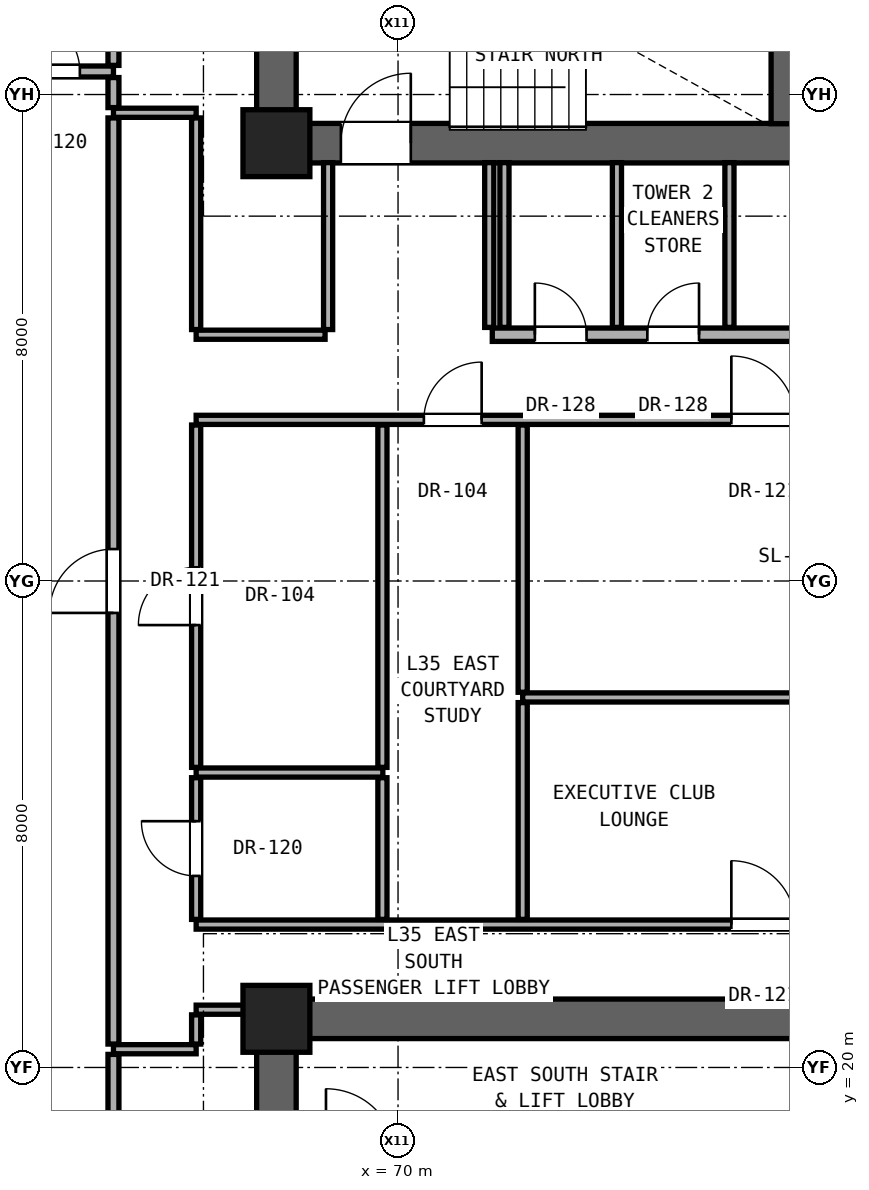
"""IFC4 building model, lengths in metres.
Left out: names, types, materials, properties, quantities, classifications, styles, units other than length and angle.
Written with IfcOpenShell. Run it as: python <this file> out.ifc"""

import sys

from ifc_helpers import new_model, si_unit, direction, frame, frame_2d, origin, origin_2d, place, context, subcontext, project, spatial, rectangle, extrude, element, fill, save


model = new_model("IFC4")
c1 = context("Model", 3, precision=1e-05, world=origin(), true_north=direction((0.0, 1.0)))
c2 = subcontext(c1, "Body", "Model", "MODEL_VIEW")
j1 = project(units=[si_unit("LENGTHUNIT", "METRE"), si_unit("PLANEANGLEUNIT", "RADIAN")], contexts=[c1])
p1 = place(None, origin())
s1 = spatial("IfcSite", under=j1, at=p1, CompositionType="ELEMENT")
p2 = place(p1, origin())
s2 = spatial("IfcBuilding", under=s1, at=p2, CompositionType="ELEMENT")
p3 = place(p2, frame((0.0, 0.0, 124.7)))
s3 = spatial("IfcBuildingStorey", under=s2, at=p3, CompositionType="ELEMENT", Elevation=124.7)
for number, where, z_axis, x_axis in (
    (1, (68.0, 20.8, 0.0), (0.0, 0.0, 1.0), (1.0, 0.0, 0.0)),
    (2, (68.0, 35.2, 0.0), (0.0, 0.0, 1.0), (1.0, 0.0, 0.0)),
):
    element("IfcColumn", number, at=place(p3, frame(where, z_axis=z_axis, x_axis=x_axis)), inside=s3, PredefinedType="COLUMN", context=c2, shape_type="SweptSolid", body=[
        extrude(rectangle(XDim=1.1, YDim=1.1, at=origin_2d()), origin(), (0.0, 0.0, 1.0), 3.3),
    ])
p4 = place(p3, frame((68.0, 35.2, 0.0), z_axis=(0.0, 0.0, 1.0), x_axis=(0.0, 1.0, 0.0)))
e3 = element("IfcWall", 3, at=p4, inside=s3, PredefinedType="SHEAR", context=c2, shape_type="SweptSolid", body=[
    extrude(rectangle(XDim=5.6, YDim=0.65, at=frame_2d((2.8, 0.0))), origin(), (0.0, 0.0, 1.0), 3.08),
])
p5 = place(p3, frame((68.0, 35.2, 0.0), z_axis=(0.0, 0.0, 1.0), x_axis=(1.0, 0.0, 0.0)))
e4 = element("IfcWall", 4, at=p5, inside=s3, PredefinedType="SHEAR", context=c2, shape_type="SweptSolid", body=[
    extrude(rectangle(XDim=17.0, YDim=0.65, at=frame_2d((8.5, 0.0))), origin(), (0.0, 0.0, 1.0), 3.08),
])
p6 = place(p5, frame((1.06, 0.0, 0.0)))
e5 = element("IfcOpeningElement", 5, at=p6, cuts=e4, PredefinedType="OPENING", context=c2, shape_type="SweptSolid", body=[
    extrude(rectangle(XDim=1.15, YDim=2.2, at=frame_2d((0.575, 1.1))), frame((0.0, 0.335, 0.0), z_axis=(0.0, -1.0, 0.0), x_axis=(1.0, 0.0, 0.0)), (0.0, 0.0, 1.0), 0.67),
])
p7 = place(p5, frame((8.75, 0.0, 0.0)))
e6 = element("IfcOpeningElement", 6, at=p7, cuts=e4, PredefinedType="OPENING", context=c2, shape_type="SweptSolid", body=[
    extrude(rectangle(XDim=1.4, YDim=2.35, at=frame_2d((0.7, 1.175))), frame((0.0, 0.335, 0.0), z_axis=(0.0, -1.0, 0.0), x_axis=(1.0, 0.0, 0.0)), (0.0, 0.0, 1.0), 0.67),
])
p8 = place(p5, frame((10.77, 0.0, 0.0)))
e7 = element("IfcOpeningElement", 7, at=p8, cuts=e4, PredefinedType="OPENING", context=c2, shape_type="SweptSolid", body=[
    extrude(rectangle(XDim=1.3, YDim=2.3, at=frame_2d((0.65, 1.15))), frame((0.0, 0.335, 0.0), z_axis=(0.0, -1.0, 0.0), x_axis=(1.0, 0.0, 0.0)), (0.0, 0.0, 1.0), 0.67),
])
p9 = place(p3, frame((68.0, 15.2, 0.0), z_axis=(0.0, 0.0, 1.0), x_axis=(0.0, 1.0, 0.0)))
e8 = element("IfcWall", 8, at=p9, inside=s3, PredefinedType="SHEAR", context=c2, shape_type="SweptSolid", body=[
    extrude(rectangle(XDim=5.6, YDim=0.65, at=frame_2d((2.8, 0.0))), origin(), (0.0, 0.0, 1.0), 3.08),
])
p10 = place(p3, frame((68.0, 20.8, 0.0), z_axis=(0.0, 0.0, 1.0), x_axis=(1.0, 0.0, 0.0)))
e9 = element("IfcWall", 9, at=p10, inside=s3, PredefinedType="SHEAR", context=c2, shape_type="SweptSolid", body=[
    extrude(rectangle(XDim=17.0, YDim=0.65, at=frame_2d((8.5, 0.0))), origin(), (0.0, 0.0, 1.0), 3.08),
])
p11 = place(p10, frame((9.55, 0.0, 0.0)))
e10 = element("IfcOpeningElement", 10, at=p11, cuts=e9, PredefinedType="OPENING", context=c2, shape_type="SweptSolid", body=[
    extrude(rectangle(XDim=1.3, YDim=2.3, at=frame_2d((0.65, 1.15))), frame((0.0, 0.335, 0.0), z_axis=(0.0, -1.0, 0.0), x_axis=(1.0, 0.0, 0.0)), (0.0, 0.0, 1.0), 0.67),
])
p12 = place(p10, frame((12.05, 0.0, 0.0)))
e11 = element("IfcOpeningElement", 11, at=p12, cuts=e9, PredefinedType="OPENING", context=c2, shape_type="SweptSolid", body=[
    extrude(rectangle(XDim=1.3, YDim=2.3, at=frame_2d((0.65, 1.15))), frame((0.0, 0.335, 0.0), z_axis=(0.0, -1.0, 0.0), x_axis=(1.0, 0.0, 0.0)), (0.0, 0.0, 1.0), 0.67),
])
p13 = place(p3, frame((65.32, 20.3, 0.0), z_axis=(0.0, 0.0, 1.0), x_axis=(1.0, 0.0, 0.0)))
e12 = element("IfcWall", 12, at=p13, inside=s3, PredefinedType="PARTITIONING", context=c2, shape_type="SweptSolid", body=[
    extrude(rectangle(XDim=1.36, YDim=0.15, at=frame_2d((0.68, 0.0))), origin(), (0.0, 0.0, 1.0), 3.08),
])
p14 = place(p3, frame((66.68, 20.95, 0.0), z_axis=(0.0, 0.0, 1.0), x_axis=(1.0, 0.0, 0.0)))
e13 = element("IfcWall", 13, at=p14, inside=s3, PredefinedType="PARTITIONING", context=c2, shape_type="SweptSolid", body=[
    extrude(rectangle(XDim=1.0, YDim=0.15, at=frame_2d((0.5, 0.0))), origin(), (0.0, 0.0, 1.0), 2.472),
])
p15 = place(p3, frame((66.68, 22.35, 0.0), z_axis=(0.0, 0.0, 1.0), x_axis=(1.0, 0.0, 0.0)))
e14 = element("IfcWall", 14, at=p15, inside=s3, PredefinedType="PARTITIONING", context=c2, shape_type="SweptSolid", body=[
    extrude(rectangle(XDim=19.5, YDim=0.15, at=frame_2d((9.75, 0.0))), origin(), (0.0, 0.0, 1.0), 2.216),
])
p16 = place(p15, frame((8.802, 0.0, 0.0)))
e15 = element("IfcOpeningElement", 15, at=p16, cuts=e14, PredefinedType="OPENING", context=c2, shape_type="SweptSolid", body=[
    extrude(rectangle(XDim=1.05, YDim=2.2, at=frame_2d((0.525, 1.1))), frame((0.0, 0.085, 0.0), z_axis=(0.0, -1.0, 0.0), x_axis=(1.0, 0.0, 0.0)), (0.0, 0.0, 1.0), 0.17),
])
p17 = place(p15, frame((15.846, 0.0, 0.0)))
e16 = element("IfcOpeningElement", 16, at=p17, cuts=e14, PredefinedType="OPENING", context=c2, shape_type="SweptSolid", body=[
    extrude(rectangle(XDim=1.05, YDim=2.2, at=frame_2d((0.525, 1.1))), frame((0.0, 0.085, 0.0), z_axis=(0.0, -1.0, 0.0), x_axis=(1.0, 0.0, 0.0)), (0.0, 0.0, 1.0), 0.17),
])
p18 = place(p3, frame((66.68, 24.85, 0.0), z_axis=(0.0, 0.0, 1.0), x_axis=(1.0, 0.0, 0.0)))
e17 = element("IfcWall", 17, at=p18, inside=s3, PredefinedType="PARTITIONING", context=c2, shape_type="SweptSolid", body=[
    extrude(rectangle(XDim=3.07, YDim=0.15, at=frame_2d((1.535, 0.0))), origin(), (0.0, 0.0, 1.0), 2.216),
])
p19 = place(p3, frame((72.05, 26.085, 0.0), z_axis=(0.0, 0.0, 1.0), x_axis=(1.0, 0.0, 0.0)))
e18 = element("IfcWall", 18, at=p19, inside=s3, PredefinedType="PARTITIONING", context=c2, shape_type="SweptSolid", body=[
    extrude(rectangle(XDim=14.13, YDim=0.15, at=frame_2d((7.065, 0.0))), origin(), (0.0, 0.0, 1.0), 2.216),
])
p20 = place(p3, frame((66.68, 30.65, 0.0), z_axis=(0.0, 0.0, 1.0), x_axis=(1.0, 0.0, 0.0)))
e19 = element("IfcWall", 19, at=p20, inside=s3, PredefinedType="PARTITIONING", context=c2, shape_type="SweptSolid", body=[
    extrude(rectangle(XDim=19.5, YDim=0.15, at=frame_2d((9.75, 0.0))), origin(), (0.0, 0.0, 1.0), 2.216),
])
p21 = place(p20, frame((3.745, 0.0, 0.0)))
e20 = element("IfcOpeningElement", 20, at=p21, cuts=e19, PredefinedType="OPENING", context=c2, shape_type="SweptSolid", body=[
    extrude(rectangle(XDim=0.95, YDim=2.15, at=frame_2d((0.475, 1.075))), frame((0.0, 0.085, 0.0), z_axis=(0.0, -1.0, 0.0), x_axis=(1.0, 0.0, 0.0)), (0.0, 0.0, 1.0), 0.17),
])
p22 = place(p20, frame((8.802, 0.0, 0.0)))
e21 = element("IfcOpeningElement", 21, at=p22, cuts=e19, PredefinedType="OPENING", context=c2, shape_type="SweptSolid", body=[
    extrude(rectangle(XDim=1.05, YDim=2.2, at=frame_2d((0.525, 1.1))), frame((0.0, 0.085, 0.0), z_axis=(0.0, -1.0, 0.0), x_axis=(1.0, 0.0, 0.0)), (0.0, 0.0, 1.0), 0.17),
])
p23 = place(p20, frame((15.846, 0.0, 0.0)))
e22 = element("IfcOpeningElement", 22, at=p23, cuts=e19, PredefinedType="OPENING", context=c2, shape_type="SweptSolid", body=[
    extrude(rectangle(XDim=1.05, YDim=2.2, at=frame_2d((0.525, 1.1))), frame((0.0, 0.085, 0.0), z_axis=(0.0, -1.0, 0.0), x_axis=(1.0, 0.0, 0.0)), (0.0, 0.0, 1.0), 0.17),
])
p24 = place(p3, frame((66.68, 32.05, 0.0), z_axis=(0.0, 0.0, 1.0), x_axis=(1.0, 0.0, 0.0)))
e23 = element("IfcWall", 23, at=p24, inside=s3, PredefinedType="PARTITIONING", context=c2, shape_type="SweptSolid", body=[
    extrude(rectangle(XDim=2.12, YDim=0.15, at=frame_2d((1.06, 0.0))), origin(), (0.0, 0.0, 1.0), 2.216),
])
p25 = place(p3, frame((71.55, 32.05, 0.0), z_axis=(0.0, 0.0, 1.0), x_axis=(1.0, 0.0, 0.0)))
e24 = element("IfcWall", 24, at=p25, inside=s3, PredefinedType="SOLIDWALL", context=c2, shape_type="SweptSolid", body=[
    extrude(rectangle(XDim=14.63, YDim=0.22, at=frame_2d((7.315, 0.0))), origin(), (0.0, 0.0, 1.0), 2.216),
])
p26 = place(p25, frame((6.065, 0.0, 0.0)))
e25 = element("IfcOpeningElement", 25, at=p26, cuts=e24, PredefinedType="OPENING", context=c2, shape_type="SweptSolid", body=[
    extrude(rectangle(XDim=0.85, YDim=2.01, at=frame_2d((0.425, 1.005))), frame((0.0, 0.12, 0.0), z_axis=(0.0, -1.0, 0.0), x_axis=(1.0, 0.0, 0.0)), (0.0, 0.0, 1.0), 0.24),
])
p27 = place(p25, frame((10.535, 0.0, 0.0)))
e26 = element("IfcOpeningElement", 26, at=p27, cuts=e24, PredefinedType="OPENING", context=c2, shape_type="SweptSolid", body=[
    extrude(rectangle(XDim=0.95, YDim=2.15, at=frame_2d((0.475, 1.075))), frame((0.0, 0.12, 0.0), z_axis=(0.0, -1.0, 0.0), x_axis=(1.0, 0.0, 0.0)), (0.0, 0.0, 1.0), 0.24),
])
p28 = place(p25, frame((0.7, 0.0, 0.0)))
e27 = element("IfcOpeningElement", 27, at=p28, cuts=e24, PredefinedType="OPENING", context=c2, shape_type="SweptSolid", body=[
    extrude(rectangle(XDim=0.85, YDim=2.01, at=frame_2d((0.425, 1.005))), frame((0.0, 0.12, 0.0), z_axis=(0.0, -1.0, 0.0), x_axis=(1.0, 0.0, 0.0)), (0.0, 0.0, 1.0), 0.24),
])
p29 = place(p25, frame((2.55, 0.0, 0.0)))
e28 = element("IfcOpeningElement", 28, at=p29, cuts=e24, PredefinedType="OPENING", context=c2, shape_type="SweptSolid", body=[
    extrude(rectangle(XDim=0.85, YDim=2.01, at=frame_2d((0.425, 1.005))), frame((0.0, 0.12, 0.0), z_axis=(0.0, -1.0, 0.0), x_axis=(1.0, 0.0, 0.0)), (0.0, 0.0, 1.0), 0.24),
])
p30 = place(p3, frame((65.32, 35.7, 0.0), z_axis=(0.0, 0.0, 1.0), x_axis=(1.0, 0.0, 0.0)))
e29 = element("IfcWall", 29, at=p30, inside=s3, PredefinedType="PARTITIONING", context=c2, shape_type="SweptSolid", body=[
    extrude(rectangle(XDim=1.36, YDim=0.15, at=frame_2d((0.68, 0.0))), origin(), (0.0, 0.0, 1.0), 3.08),
])
p31 = place(p3, frame((59.179, 36.379, 0.0), z_axis=(0.0, 0.0, 1.0), x_axis=(1.0, 0.0, 0.0)))
e30 = element("IfcWall", 30, at=p31, inside=s3, PredefinedType="PARTITIONING", context=c2, shape_type="SweptSolid", body=[
    extrude(rectangle(XDim=6.141, YDim=0.18, at=frame_2d((3.071, 0.0))), origin(), (0.0, 0.0, 1.0), 2.523),
])
p32 = place(p31, frame((2.583, 0.0, 0.0)))
e31 = element("IfcOpeningElement", 31, at=p32, cuts=e30, PredefinedType="OPENING", context=c2, shape_type="SweptSolid", body=[
    extrude(rectangle(XDim=0.95, YDim=2.15, at=frame_2d((0.475, 1.075))), frame((0.0, 0.1, 0.0), z_axis=(0.0, -1.0, 0.0), x_axis=(1.0, 0.0, 0.0)), (0.0, 0.0, 1.0), 0.2),
])
p33 = place(p31, frame((4.688, 0.0, 0.0)))
e32 = element("IfcOpeningElement", 32, at=p33, cuts=e30, PredefinedType="OPENING", context=c2, shape_type="SweptSolid", body=[
    extrude(rectangle(XDim=0.9, YDim=2.1, at=frame_2d((0.45, 1.05))), frame((0.0, 0.1, 0.0), z_axis=(0.0, -1.0, 0.0), x_axis=(1.0, 0.0, 0.0)), (0.0, 0.0, 1.0), 0.2),
])
p34 = place(p3, frame((65.32, 17.001, 0.0), z_axis=(0.0, 0.0, 1.0), x_axis=(0.0, 1.0, 0.0)))
e33 = element("IfcWall", 33, at=p34, inside=s3, PredefinedType="PARTITIONING", context=c2, shape_type="SweptSolid", body=[
    extrude(rectangle(XDim=3.214, YDim=0.18, at=frame_2d((1.607, 0.0))), origin(), (0.0, 0.0, 1.0), 2.523),
])
p35 = place(p3, frame((65.32, 20.385, 0.0), z_axis=(0.0, 0.0, 1.0), x_axis=(0.0, 1.0, 0.0)))
e34 = element("IfcWall", 34, at=p35, inside=s3, PredefinedType="PARTITIONING", context=c2, shape_type="SweptSolid", body=[
    extrude(rectangle(XDim=15.23, YDim=0.18, at=frame_2d((7.615, 0.0))), origin(), (0.0, 0.0, 1.0), 2.376),
])
p36 = place(p35, frame((7.09, 0.0, 0.0)))
e35 = element("IfcOpeningElement", 35, at=p36, cuts=e34, PredefinedType="OPENING", context=c2, shape_type="SweptSolid", body=[
    extrude(rectangle(XDim=1.05, YDim=2.2, at=frame_2d((0.525, 1.1))), frame((0.0, 0.1, 0.0), z_axis=(0.0, -1.0, 0.0), x_axis=(1.0, 0.0, 0.0)), (0.0, 0.0, 1.0), 0.2),
])
p37 = place(p3, frame((65.32, 35.785, 0.0), z_axis=(0.0, 0.0, 1.0), x_axis=(0.0, 1.0, 0.0)))
e36 = element("IfcWall", 36, at=p37, inside=s3, PredefinedType="PARTITIONING", context=c2, shape_type="SweptSolid", body=[
    extrude(rectangle(XDim=0.494, YDim=0.18, at=frame_2d((0.247, 0.0))), origin(), (0.0, 0.0, 1.0), 3.08),
])
p38 = place(p3, frame((65.32, 36.479, 0.0), z_axis=(0.0, 0.0, 1.0), x_axis=(0.0, 1.0, 0.0)))
e37 = element("IfcWall", 37, at=p38, inside=s3, PredefinedType="PARTITIONING", context=c2, shape_type="SweptSolid", body=[
    extrude(rectangle(XDim=2.548, YDim=0.18, at=frame_2d((1.274, 0.0))), origin(), (0.0, 0.0, 1.0), 2.523),
])
p39 = place(p3, frame((66.68, 20.385, 0.0), z_axis=(0.0, 0.0, 1.0), x_axis=(0.0, 1.0, 0.0)))
e38 = element("IfcWall", 38, at=p39, inside=s3, PredefinedType="PARTITIONING", context=c2, shape_type="SweptSolid", body=[
    extrude(rectangle(XDim=0.48, YDim=0.15, at=frame_2d((0.24, 0.0))), origin(), (0.0, 0.0, 1.0), 2.472),
])
p40 = place(p3, frame((66.68, 22.435, 0.0), z_axis=(0.0, 0.0, 1.0), x_axis=(0.0, 1.0, 0.0)))
e39 = element("IfcWall", 39, at=p40, inside=s3, PredefinedType="PARTITIONING", context=c2, shape_type="SweptSolid", body=[
    extrude(rectangle(XDim=2.33, YDim=0.15, at=frame_2d((1.165, 0.0))), origin(), (0.0, 0.0, 1.0), 3.08),
])
p41 = place(p40, frame((0.715, 0.0, 0.0)))
e40 = element("IfcOpeningElement", 40, at=p41, cuts=e39, PredefinedType="OPENING", context=c2, shape_type="SweptSolid", body=[
    extrude(rectangle(XDim=0.9, YDim=2.1, at=frame_2d((0.45, 1.05))), frame((0.0, 0.085, 0.0), z_axis=(0.0, -1.0, 0.0), x_axis=(1.0, 0.0, 0.0)), (0.0, 0.0, 1.0), 0.17),
])
p42 = place(p3, frame((66.68, 24.935, 0.0), z_axis=(0.0, 0.0, 1.0), x_axis=(0.0, 1.0, 0.0)))
e41 = element("IfcWall", 41, at=p42, inside=s3, PredefinedType="PARTITIONING", context=c2, shape_type="SweptSolid", body=[
    extrude(rectangle(XDim=5.63, YDim=0.15, at=frame_2d((2.815, 0.0))), origin(), (0.0, 0.0, 1.0), 2.376),
])
p43 = place(p42, frame((2.34, 0.0, 0.0)))
e42 = element("IfcOpeningElement", 42, at=p43, cuts=e41, PredefinedType="OPENING", context=c2, shape_type="SweptSolid", body=[
    extrude(rectangle(XDim=0.95, YDim=2.15, at=frame_2d((0.475, 1.075))), frame((0.0, 0.085, 0.0), z_axis=(0.0, -1.0, 0.0), x_axis=(1.0, 0.0, 0.0)), (0.0, 0.0, 1.0), 0.17),
])
p44 = place(p3, frame((66.68, 32.135, 0.0), z_axis=(0.0, 0.0, 1.0), x_axis=(0.0, 1.0, 0.0)))
e43 = element("IfcWall", 43, at=p44, inside=s3, PredefinedType="PARTITIONING", context=c2, shape_type="SweptSolid", body=[
    extrude(rectangle(XDim=3.48, YDim=0.15, at=frame_2d((1.74, 0.0))), origin(), (0.0, 0.0, 1.0), 2.472),
])
p45 = place(p3, frame((68.85, 32.135, 0.0), z_axis=(0.0, 0.0, 1.0), x_axis=(0.0, 1.0, 0.0)))
e44 = element("IfcWall", 44, at=p45, inside=s3, PredefinedType="PARTITIONING", context=c2, shape_type="SweptSolid", body=[
    extrude(rectangle(XDim=2.745, YDim=0.15, at=frame_2d((1.373, 0.0))), origin(), (0.0, 0.0, 1.0), 3.08),
])
p46 = place(p3, frame((69.743, 22.435, 0.0), z_axis=(0.0, 0.0, 1.0), x_axis=(0.0, 1.0, 0.0)))
e45 = element("IfcWall", 45, at=p46, inside=s3, PredefinedType="PARTITIONING", context=c2, shape_type="SweptSolid", body=[
    extrude(rectangle(XDim=2.33, YDim=0.15, at=frame_2d((1.165, 0.0))), origin(), (0.0, 0.0, 1.0), 3.08),
])
p47 = place(p3, frame((69.743, 24.935, 0.0), z_axis=(0.0, 0.0, 1.0), x_axis=(0.0, 1.0, 0.0)))
e46 = element("IfcWall", 46, at=p47, inside=s3, PredefinedType="PARTITIONING", context=c2, shape_type="SweptSolid", body=[
    extrude(rectangle(XDim=5.63, YDim=0.15, at=frame_2d((2.815, 0.0))), origin(), (0.0, 0.0, 1.0), 2.216),
])
for number, where, z_axis, x_axis in (
    (47, (71.5, 32.17, 0.0), (0.0, 0.0, 1.0), (0.0, 1.0, 0.0)),
    (48, (71.75, 32.17, 0.0), (0.0, 0.0, 1.0), (0.0, 1.0, 0.0)),
):
    element("IfcWall", number, at=place(p3, frame(where, z_axis=z_axis, x_axis=x_axis)), inside=s3, PredefinedType="PARTITIONING", context=c2, shape_type="SweptSolid", body=[
        extrude(rectangle(XDim=2.71, YDim=0.15, at=frame_2d((1.355, 0.0))), origin(), (0.0, 0.0, 1.0), 3.08),
    ])
p48 = place(p3, frame((72.05, 22.435, 0.0), z_axis=(0.0, 0.0, 1.0), x_axis=(0.0, 1.0, 0.0)))
e49 = element("IfcWall", 49, at=p48, inside=s3, PredefinedType="PARTITIONING", context=c2, shape_type="SweptSolid", body=[
    extrude(rectangle(XDim=3.565, YDim=0.15, at=frame_2d((1.782, 0.0))), origin(), (0.0, 0.0, 1.0), 3.08),
])
p49 = place(p3, frame((72.05, 26.17, 0.0), z_axis=(0.0, 0.0, 1.0), x_axis=(0.0, 1.0, 0.0)))
e50 = element("IfcWall", 50, at=p49, inside=s3, PredefinedType="PARTITIONING", context=c2, shape_type="SweptSolid", body=[
    extrude(rectangle(XDim=4.395, YDim=0.15, at=frame_2d((2.198, 0.0))), origin(), (0.0, 0.0, 1.0), 2.216),
])
for number, where, z_axis, x_axis in (
    (51, (73.6, 32.17, 0.0), (0.0, 0.0, 1.0), (0.0, 1.0, 0.0)),
    (52, (75.45, 32.17, 0.0), (0.0, 0.0, 1.0), (0.0, 1.0, 0.0)),
):
    element("IfcWall", number, at=place(p3, frame(where, z_axis=z_axis, x_axis=x_axis)), inside=s3, PredefinedType="PARTITIONING", context=c2, shape_type="SweptSolid", body=[
        extrude(rectangle(XDim=2.71, YDim=0.15, at=frame_2d((1.355, 0.0))), origin(), (0.0, 0.0, 1.0), 3.08),
    ])
p50 = place(p3, frame((76.36, 35.52, 0.0), z_axis=(0.0, 0.0, 1.0), x_axis=(0.0, 1.0, 0.0)))
e53 = element("IfcWall", 53, at=p50, inside=s3, PredefinedType="SHEAR", context=c2, shape_type="SweptSolid", body=[
    extrude(rectangle(XDim=2.745, YDim=0.45, at=frame_2d((1.373, 0.0))), origin(), (0.0, 0.0, 1.0), 3.08),
])
p51 = place(p6, origin())
e54 = element("IfcDoor", 54, at=p51, inside=s3, OperationType="SINGLE_SWING_RIGHT", PredefinedType="DOOR", context=c2, shape_type="SweptSolid", body=[
    extrude(rectangle(XDim=1.15, YDim=2.2, at=frame_2d((0.575, 1.1))), frame((0.0, 0.025, 0.0), z_axis=(0.0, -1.0, 0.0), x_axis=(1.0, 0.0, 0.0)), (0.0, 0.0, 1.0), 0.05),
])
fill(e5, e54)
p52 = place(p28, origin())
e55 = element("IfcDoor", 55, at=p52, inside=s3, OperationType="SINGLE_SWING_LEFT", PredefinedType="DOOR", context=c2, shape_type="SweptSolid", body=[
    extrude(rectangle(XDim=0.85, YDim=2.01, at=frame_2d((0.425, 1.005))), frame((0.0, 0.025, 0.0), z_axis=(0.0, -1.0, 0.0), x_axis=(1.0, 0.0, 0.0)), (0.0, 0.0, 1.0), 0.05),
])
fill(e27, e55)
p53 = place(p29, origin())
e56 = element("IfcDoor", 56, at=p53, inside=s3, OperationType="SINGLE_SWING_RIGHT", PredefinedType="DOOR", context=c2, shape_type="SweptSolid", body=[
    extrude(rectangle(XDim=0.85, YDim=2.01, at=frame_2d((0.425, 1.005))), frame((0.0, 0.025, 0.0), z_axis=(0.0, -1.0, 0.0), x_axis=(1.0, 0.0, 0.0)), (0.0, 0.0, 1.0), 0.05),
])
fill(e28, e56)
p54 = place(p41, origin())
e57 = element("IfcDoor", 57, at=p54, inside=s3, OperationType="SINGLE_SWING_RIGHT", PredefinedType="DOOR", context=c2, shape_type="SweptSolid", body=[
    extrude(rectangle(XDim=0.9, YDim=2.1, at=frame_2d((0.45, 1.05))), frame((0.0, 0.025, 0.0), z_axis=(0.0, -1.0, 0.0), x_axis=(1.0, 0.0, 0.0)), (0.0, 0.0, 1.0), 0.05),
])
fill(e40, e57)
p55 = place(p36, origin())
e58 = element("IfcDoor", 58, at=p55, inside=s3, OperationType="SINGLE_SWING_LEFT", PredefinedType="DOOR", context=c2, shape_type="SweptSolid", body=[
    extrude(rectangle(XDim=1.05, YDim=2.2, at=frame_2d((0.525, 1.1))), frame((0.0, 0.025, 0.0), z_axis=(0.0, -1.0, 0.0), x_axis=(1.0, 0.0, 0.0)), (0.0, 0.0, 1.0), 0.05),
])
fill(e35, e58)
p56 = place(p33, origin())
e59 = element("IfcDoor", 59, at=p56, inside=s3, OperationType="SINGLE_SWING_LEFT", PredefinedType="DOOR", context=c2, shape_type="SweptSolid", body=[
    extrude(rectangle(XDim=0.9, YDim=2.1, at=frame_2d((0.45, 1.05))), frame((0.0, 0.025, 0.0), z_axis=(0.0, -1.0, 0.0), x_axis=(1.0, 0.0, 0.0)), (0.0, 0.0, 1.0), 0.05),
])
fill(e32, e59)
p57 = place(p43, origin())
e60 = element("IfcDoor", 60, at=p57, inside=s3, OperationType="SINGLE_SWING_LEFT", PredefinedType="DOOR", context=c2, shape_type="SweptSolid", body=[
    extrude(rectangle(XDim=0.95, YDim=2.15, at=frame_2d((0.475, 1.075))), frame((0.0, 0.025, 0.0), z_axis=(0.0, -1.0, 0.0), x_axis=(1.0, 0.0, 0.0)), (0.0, 0.0, 1.0), 0.05),
])
fill(e42, e60)
p58 = place(p21, origin())
e61 = element("IfcDoor", 61, at=p58, inside=s3, OperationType="SINGLE_SWING_RIGHT", PredefinedType="DOOR", context=c2, shape_type="SweptSolid", body=[
    extrude(rectangle(XDim=0.95, YDim=2.15, at=frame_2d((0.475, 1.075))), frame((0.0, 0.025, 0.0), z_axis=(0.0, -1.0, 0.0), x_axis=(1.0, 0.0, 0.0)), (0.0, 0.0, 1.0), 0.05),
])
fill(e20, e61)
p59 = place(p16, origin())
e62 = element("IfcDoor", 62, at=p59, inside=s3, OperationType="SINGLE_SWING_LEFT", PredefinedType="DOOR", context=c2, shape_type="SweptSolid", body=[
    extrude(rectangle(XDim=1.05, YDim=2.2, at=frame_2d((0.525, 1.1))), frame((0.0, 0.025, 0.0), z_axis=(0.0, -1.0, 0.0), x_axis=(1.0, 0.0, 0.0)), (0.0, 0.0, 1.0), 0.05),
])
fill(e15, e62)
p60 = place(p22, origin())
e63 = element("IfcDoor", 63, at=p60, inside=s3, OperationType="SINGLE_SWING_LEFT", PredefinedType="DOOR", context=c2, shape_type="SweptSolid", body=[
    extrude(rectangle(XDim=1.05, YDim=2.2, at=frame_2d((0.525, 1.1))), frame((0.0, 0.025, 0.0), z_axis=(0.0, -1.0, 0.0), x_axis=(1.0, 0.0, 0.0)), (0.0, 0.0, 1.0), 0.05),
])
fill(e21, e63)
save(model, sys.argv[1])
